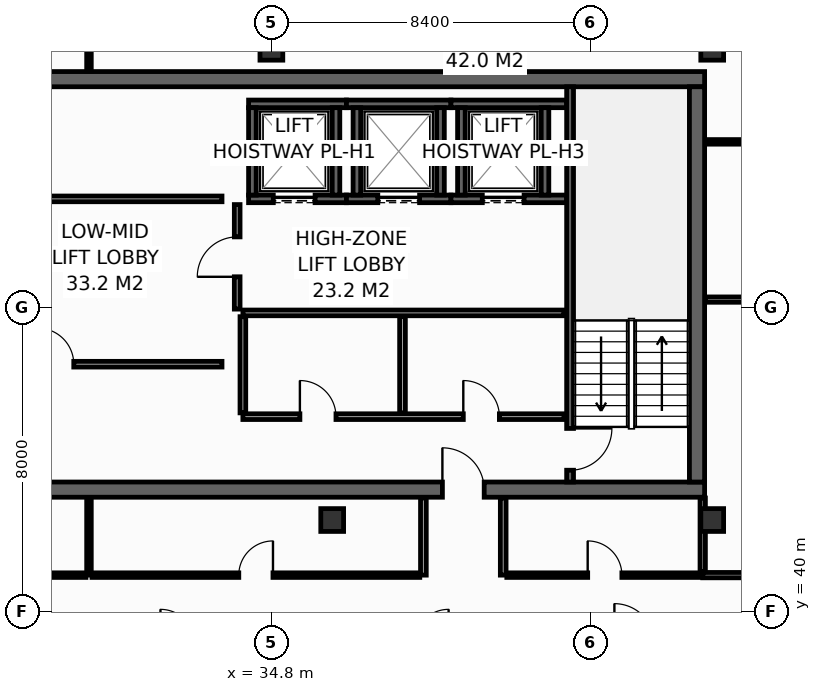
"""IFC4 building model, lengths in metres.
Left out: names, types, materials, properties, quantities, classifications, styles, units other than length and angle.
Written with IfcOpenShell. Run it as: python <this file> out.ifc"""

import sys

from ifc_helpers import new_model, si_unit, direction, frame, frame_2d, origin, origin_2d, place, context, subcontext, project, spatial, rectangle, hollow_rectangle, extrude, element, fill, save


model = new_model("IFC4")
c1 = context("Model", 3, precision=1e-05, world=origin(), true_north=direction((0.0, 1.0)))
c2 = subcontext(c1, "Body", "Model", "MODEL_VIEW")
j1 = project(units=[si_unit("LENGTHUNIT", "METRE"), si_unit("PLANEANGLEUNIT", "RADIAN")], contexts=[c1])
p1 = place(None, origin())
s1 = spatial("IfcSite", under=j1, at=p1, CompositionType="ELEMENT")
p2 = place(p1, origin())
s2 = spatial("IfcBuilding", under=s1, at=p2, CompositionType="ELEMENT")
p3 = place(p2, frame((0.0, 0.0, 283.8)))
s3 = spatial("IfcBuildingStorey", under=s2, at=p3, CompositionType="ELEMENT", Elevation=283.8)
p4 = place(p3, frame((13.7, 43.2, 0.0), z_axis=(0.0, 0.0, 1.0), x_axis=(1.0, 0.0, 0.0)))
e1 = element("IfcWall", 1, at=p4, inside=s3, PredefinedType="SHEAR", context=c2, shape_type="SweptSolid", body=[
    extrude(rectangle(XDim=32.5, YDim=0.4, at=frame_2d((16.25, 0.0))), origin(), (0.0, 0.0, 1.0), 3.55),
])
p5 = place(p4, frame((5.4, 0.0, 0.0)))
e2 = element("IfcOpeningElement", 2, at=p5, cuts=e1, PredefinedType="OPENING", context=c2, shape_type="SweptSolid", body=[
    extrude(rectangle(XDim=1.1, YDim=2.15, at=frame_2d((0.55, 1.075))), frame((0.0, 0.21, 0.0), z_axis=(0.0, -1.0, 0.0), x_axis=(1.0, 0.0, 0.0)), (0.0, 0.0, 1.0), 0.42),
])
p6 = place(p4, frame((25.6, 0.0, 0.0)))
e3 = element("IfcOpeningElement", 3, at=p6, cuts=e1, PredefinedType="OPENING", context=c2, shape_type="SweptSolid", body=[
    extrude(rectangle(XDim=1.1, YDim=2.15, at=frame_2d((0.55, 1.075))), frame((0.0, 0.21, 0.0), z_axis=(0.0, -1.0, 0.0), x_axis=(1.0, 0.0, 0.0)), (0.0, 0.0, 1.0), 0.42),
])
p7 = place(p3, frame((13.7, 54.0, 0.0), z_axis=(0.0, 0.0, 1.0), x_axis=(1.0, 0.0, 0.0)))
e4 = element("IfcWall", 4, at=p7, inside=s3, PredefinedType="SHEAR", context=c2, shape_type="SweptSolid", body=[
    extrude(rectangle(XDim=32.5, YDim=0.4, at=frame_2d((16.25, 0.0))), origin(), (0.0, 0.0, 1.0), 3.55),
])
p8 = place(p3, frame((46.0, 43.4, 0.0), z_axis=(0.0, 0.0, 1.0), x_axis=(0.0, 1.0, 0.0)))
e5 = element("IfcWall", 5, at=p8, inside=s3, PredefinedType="SHEAR", context=c2, shape_type="SweptSolid", body=[
    extrude(rectangle(XDim=10.4, YDim=0.4, at=frame_2d((5.2, 0.0))), origin(), (0.0, 0.0, 1.0), 3.55),
])
for number, where, z_axis, x_axis in (
    (6, (34.8, 54.8, 0.0), (0.0, 0.0, 1.0), (1.0, 0.0, 0.0)),
    (7, (46.4, 54.8, 0.0), (0.0, 0.0, 1.0), (1.0, 0.0, 0.0)),
    (8, (36.4, 42.4, 0.0), (0.0, 0.0, 1.0), (1.0, 0.0, 0.0)),
    (9, (46.4, 42.4, 0.0), (0.0, 0.0, 1.0), (1.0, 0.0, 0.0)),
):
    element("IfcColumn", number, at=place(p3, frame(where, z_axis=z_axis, x_axis=x_axis)), inside=s3, PredefinedType="COLUMN", context=c2, shape_type="SweptSolid", body=[
        extrude(hollow_rectangle(XDim=0.6, YDim=0.6, WallThickness=0.028, at=origin_2d()), origin(), (0.0, 0.0, 1.0), 3.8),
    ])
p9 = place(p3, frame((34.2, 50.85, 0.0), z_axis=(0.0, 0.0, 1.0), x_axis=(1.0, 0.0, 0.0)))
e10 = element("IfcWall", 10, at=p9, inside=s3, PredefinedType="SHEAR", context=c2, shape_type="SweptSolid", body=[
    extrude(rectangle(XDim=2.575, YDim=0.2, at=frame_2d((1.288, 0.0))), origin(), (0.0, 0.0, 1.0), 3.55),
])
p10 = place(p9, frame((0.65, 0.0, 0.0)))
e11 = element("IfcOpeningElement", 11, at=p10, cuts=e10, PredefinedType="OPENING", context=c2, shape_type="SweptSolid", body=[
    extrude(rectangle(XDim=1.1, YDim=2.2, at=frame_2d((0.55, 1.1))), frame((0.0, 0.11, 0.0), z_axis=(0.0, -1.0, 0.0), x_axis=(1.0, 0.0, 0.0)), (0.0, 0.0, 1.0), 0.22),
])
p11 = place(p3, frame((34.2, 53.35, 0.0), z_axis=(0.0, 0.0, 1.0), x_axis=(1.0, 0.0, 0.0)))
e12 = element("IfcWall", 12, at=p11, inside=s3, PredefinedType="SHEAR", context=c2, shape_type="SweptSolid", body=[
    extrude(rectangle(XDim=2.575, YDim=0.2, at=frame_2d((1.288, 0.0))), origin(), (0.0, 0.0, 1.0), 3.55),
])
for number, where, z_axis, x_axis in (
    (13, (34.3, 50.95, 0.0), (0.0, 0.0, 1.0), (0.0, 1.0, 0.0)),
    (14, (36.5, 50.95, 0.0), (0.0, 0.0, 1.0), (0.0, 1.0, 0.0)),
):
    element("IfcWall", number, at=place(p3, frame(where, z_axis=z_axis, x_axis=x_axis)), inside=s3, PredefinedType="SHEAR", context=c2, shape_type="SweptSolid", body=[
        extrude(rectangle(XDim=2.3, YDim=0.2, at=frame_2d((1.15, 0.0))), origin(), (0.0, 0.0, 1.0), 3.55),
    ])
p12 = place(p3, frame((36.775, 50.85, 0.0), z_axis=(0.0, 0.0, 1.0), x_axis=(1.0, 0.0, 0.0)))
e15 = element("IfcWall", 15, at=p12, inside=s3, PredefinedType="SHEAR", context=c2, shape_type="SweptSolid", body=[
    extrude(rectangle(XDim=2.75, YDim=0.2, at=frame_2d((1.375, 0.0))), origin(), (0.0, 0.0, 1.0), 3.55),
])
p13 = place(p12, frame((0.825, 0.0, 0.0)))
e16 = element("IfcOpeningElement", 16, at=p13, cuts=e15, PredefinedType="OPENING", context=c2, shape_type="SweptSolid", body=[
    extrude(rectangle(XDim=1.1, YDim=2.2, at=frame_2d((0.55, 1.1))), frame((0.0, 0.11, 0.0), z_axis=(0.0, -1.0, 0.0), x_axis=(1.0, 0.0, 0.0)), (0.0, 0.0, 1.0), 0.22),
])
p14 = place(p3, frame((36.775, 53.35, 0.0), z_axis=(0.0, 0.0, 1.0), x_axis=(1.0, 0.0, 0.0)))
e17 = element("IfcWall", 17, at=p14, inside=s3, PredefinedType="SHEAR", context=c2, shape_type="SweptSolid", body=[
    extrude(rectangle(XDim=2.75, YDim=0.2, at=frame_2d((1.375, 0.0))), origin(), (0.0, 0.0, 1.0), 3.55),
])
for number, where, z_axis, x_axis in (
    (18, (37.05, 50.95, 0.0), (0.0, 0.0, 1.0), (0.0, 1.0, 0.0)),
    (19, (39.25, 50.95, 0.0), (0.0, 0.0, 1.0), (0.0, 1.0, 0.0)),
):
    element("IfcWall", number, at=place(p3, frame(where, z_axis=z_axis, x_axis=x_axis)), inside=s3, PredefinedType="SHEAR", context=c2, shape_type="SweptSolid", body=[
        extrude(rectangle(XDim=2.3, YDim=0.2, at=frame_2d((1.15, 0.0))), origin(), (0.0, 0.0, 1.0), 3.55),
    ])
p15 = place(p3, frame((39.525, 50.85, 0.0), z_axis=(0.0, 0.0, 1.0), x_axis=(1.0, 0.0, 0.0)))
e20 = element("IfcWall", 20, at=p15, inside=s3, PredefinedType="SHEAR", context=c2, shape_type="SweptSolid", body=[
    extrude(rectangle(XDim=3.045, YDim=0.2, at=frame_2d((1.522, 0.0))), origin(), (0.0, 0.0, 1.0), 3.55),
])
p16 = place(p15, frame((0.825, 0.0, 0.0)))
e21 = element("IfcOpeningElement", 21, at=p16, cuts=e20, PredefinedType="OPENING", context=c2, shape_type="SweptSolid", body=[
    extrude(rectangle(XDim=1.1, YDim=2.2, at=frame_2d((0.55, 1.1))), frame((0.0, 0.11, 0.0), z_axis=(0.0, -1.0, 0.0), x_axis=(1.0, 0.0, 0.0)), (0.0, 0.0, 1.0), 0.22),
])
p17 = place(p3, frame((39.525, 53.35, 0.0), z_axis=(0.0, 0.0, 1.0), x_axis=(1.0, 0.0, 0.0)))
e22 = element("IfcWall", 22, at=p17, inside=s3, PredefinedType="SHEAR", context=c2, shape_type="SweptSolid", body=[
    extrude(rectangle(XDim=3.045, YDim=0.2, at=frame_2d((1.522, 0.0))), origin(), (0.0, 0.0, 1.0), 3.55),
])
for number, where, z_axis, x_axis in (
    (23, (39.8, 50.95, 0.0), (0.0, 0.0, 1.0), (0.0, 1.0, 0.0)),
    (24, (42.0, 50.95, 0.0), (0.0, 0.0, 1.0), (0.0, 1.0, 0.0)),
):
    element("IfcWall", number, at=place(p3, frame(where, z_axis=z_axis, x_axis=x_axis)), inside=s3, PredefinedType="SHEAR", context=c2, shape_type="SweptSolid", body=[
        extrude(rectangle(XDim=2.3, YDim=0.2, at=frame_2d((1.15, 0.0))), origin(), (0.0, 0.0, 1.0), 3.55),
    ])
p18 = place(p3, frame((42.66, 53.8, 0.0), z_axis=(0.0, 0.0, 1.0), x_axis=(0.0, -1.0, 0.0)))
e25 = element("IfcWall", 25, at=p18, inside=s3, PredefinedType="SHEAR", context=c2, shape_type="SweptSolid", body=[
    extrude(rectangle(XDim=10.4, YDim=0.18, at=frame_2d((5.2, 0.0))), origin(), (0.0, 0.0, 1.0), 3.55),
])
p19 = place(p18, frame((8.99, 0.0, 0.0)))
e26 = element("IfcOpeningElement", 26, at=p19, cuts=e25, PredefinedType="OPENING", context=c2, shape_type="SweptSolid", body=[
    extrude(rectangle(XDim=1.1, YDim=2.15, at=frame_2d((0.55, 1.075))), frame((0.0, 0.1, 0.0), z_axis=(0.0, -1.0, 0.0), x_axis=(1.0, 0.0, 0.0)), (0.0, 0.0, 1.0), 0.2),
])
p20 = place(p3, frame((33.9, 47.95, 0.0), z_axis=(0.0, 0.0, 1.0), x_axis=(0.0, 1.0, 0.0)))
e27 = element("IfcWall", 27, at=p20, inside=s3, PredefinedType="PARTITIONING", context=c2, shape_type="SweptSolid", body=[
    extrude(rectangle(XDim=2.75, YDim=0.15, at=frame_2d((1.375, 0.0))), origin(), (0.0, 0.0, 1.0), 3.55),
])
p21 = place(p20, frame((0.85, 0.0, 0.0)))
e28 = element("IfcOpeningElement", 28, at=p21, cuts=e27, PredefinedType="OPENING", context=c2, shape_type="SweptSolid", body=[
    extrude(rectangle(XDim=1.05, YDim=2.15, at=frame_2d((0.525, 1.075))), frame((0.0, 0.085, 0.0), z_axis=(0.0, -1.0, 0.0), x_axis=(1.0, 0.0, 0.0)), (0.0, 0.0, 1.0), 0.17),
])
p22 = place(p3, frame((34.05, 45.12, 0.0), z_axis=(0.0, 0.0, 1.0), x_axis=(1.0, 0.0, 0.0)))
e29 = element("IfcWall", 29, at=p22, inside=s3, PredefinedType="PARTITIONING", context=c2, shape_type="SweptSolid", body=[
    extrude(rectangle(XDim=8.45, YDim=0.15, at=frame_2d((4.225, 0.0))), origin(), (0.0, 0.0, 1.0), 3.55),
])
p23 = place(p22, frame((1.5, 0.0, 0.0)))
e30 = element("IfcOpeningElement", 30, at=p23, cuts=e29, PredefinedType="OPENING", context=c2, shape_type="SweptSolid", body=[
    extrude(rectangle(XDim=0.95, YDim=2.15, at=frame_2d((0.475, 1.075))), frame((0.0, 0.085, 0.0), z_axis=(0.0, -1.0, 0.0), x_axis=(1.0, 0.0, 0.0)), (0.0, 0.0, 1.0), 0.17),
])
p24 = place(p22, frame((5.8, 0.0, 0.0)))
e31 = element("IfcOpeningElement", 31, at=p24, cuts=e29, PredefinedType="OPENING", context=c2, shape_type="SweptSolid", body=[
    extrude(rectangle(XDim=0.95, YDim=2.15, at=frame_2d((0.475, 1.075))), frame((0.0, 0.085, 0.0), z_axis=(0.0, -1.0, 0.0), x_axis=(1.0, 0.0, 0.0)), (0.0, 0.0, 1.0), 0.17),
])
p25 = place(p3, frame((34.05, 47.85, 0.0), z_axis=(0.0, 0.0, 1.0), x_axis=(1.0, 0.0, 0.0)))
e32 = element("IfcWall", 32, at=p25, inside=s3, PredefinedType="PARTITIONING", context=c2, shape_type="SweptSolid", body=[
    extrude(rectangle(XDim=8.45, YDim=0.15, at=frame_2d((4.225, 0.0))), origin(), (0.0, 0.0, 1.0), 3.55),
])
for number, where, z_axis, x_axis in (
    (33, (38.25, 45.22, 0.0), (0.0, 0.0, 1.0), (0.0, 1.0, 0.0)),
    (34, (34.05, 45.22, 0.0), (0.0, 0.0, 1.0), (0.0, 1.0, 0.0)),
):
    element("IfcWall", number, at=place(p3, frame(where, z_axis=z_axis, x_axis=x_axis)), inside=s3, PredefinedType="PARTITIONING", context=c2, shape_type="SweptSolid", body=[
        extrude(rectangle(XDim=2.53, YDim=0.15, at=frame_2d((1.265, 0.0))), origin(), (0.0, 0.0, 1.0), 3.55),
    ])
p26 = place(p3, frame((25.85, 50.85, 0.0), z_axis=(0.0, 0.0, 1.0), x_axis=(1.0, 0.0, 0.0)))
e35 = element("IfcWall", 35, at=p26, inside=s3, PredefinedType="PARTITIONING", context=c2, shape_type="SweptSolid", body=[
    extrude(rectangle(XDim=7.65, YDim=0.15, at=frame_2d((3.825, 0.0))), origin(), (0.0, 0.0, 1.0), 3.55),
])
p27 = place(p26, frame((1.25, 0.0, 0.0)))
e36 = element("IfcOpeningElement", 36, at=p27, cuts=e35, PredefinedType="OPENING", context=c2, shape_type="SweptSolid", body=[
    extrude(rectangle(XDim=0.95, YDim=2.15, at=frame_2d((0.475, 1.075))), frame((0.0, 0.085, 0.0), z_axis=(0.0, -1.0, 0.0), x_axis=(1.0, 0.0, 0.0)), (0.0, 0.0, 1.0), 0.17),
])
p28 = place(p3, frame((25.85, 46.5, 0.0), z_axis=(0.0, 0.0, 1.0), x_axis=(1.0, 0.0, 0.0)))
e37 = element("IfcWall", 37, at=p28, inside=s3, PredefinedType="PARTITIONING", context=c2, shape_type="SweptSolid", body=[
    extrude(rectangle(XDim=7.65, YDim=0.15, at=frame_2d((3.825, 0.0))), origin(), (0.0, 0.0, 1.0), 3.55),
])
p29 = place(p28, frame((2.8, 0.0, 0.0)))
e38 = element("IfcOpeningElement", 38, at=p29, cuts=e37, PredefinedType="OPENING", context=c2, shape_type="SweptSolid", body=[
    extrude(rectangle(XDim=0.95, YDim=2.15, at=frame_2d((0.475, 1.075))), frame((0.0, 0.085, 0.0), z_axis=(0.0, -1.0, 0.0), x_axis=(1.0, 0.0, 0.0)), (0.0, 0.0, 1.0), 0.17),
])
p30 = place(p3, frame((46.15, 40.95, 0.0), z_axis=(0.0, 0.0, 1.0), x_axis=(1.0, 0.0, 0.0)))
e39 = element("IfcWall", 39, at=p30, inside=s3, PredefinedType="PARTITIONING", context=c2, shape_type="SweptSolid", body=[
    extrude(rectangle(XDim=4.05, YDim=0.14, at=frame_2d((2.025, 0.0))), origin(), (0.0, 0.0, 1.0), 3.55),
])
p31 = place(p3, frame((46.15, 41.04, 0.0), z_axis=(0.0, 0.0, 1.0), x_axis=(0.0, 1.0, 0.0)))
e40 = element("IfcWall", 40, at=p31, inside=s3, PredefinedType="PARTITIONING", context=c2, shape_type="SweptSolid", body=[
    extrude(rectangle(XDim=1.94, YDim=0.14, at=frame_2d((0.97, 0.0))), origin(), (0.0, 0.0, 1.0), 3.55),
])
p32 = place(p3, frame((46.22, 48.2, 0.0), z_axis=(0.0, 0.0, 1.0), x_axis=(1.0, 0.0, 0.0)))
e41 = element("IfcWall", 41, at=p32, inside=s3, PredefinedType="PARTITIONING", context=c2, shape_type="SweptSolid", body=[
    extrude(rectangle(XDim=3.98, YDim=0.14, at=frame_2d((1.99, 0.0))), origin(), (0.0, 0.0, 1.0), 3.55),
])
p33 = place(p3, frame((46.22, 52.35, 0.0), z_axis=(0.0, 0.0, 1.0), x_axis=(1.0, 0.0, 0.0)))
e42 = element("IfcWall", 42, at=p33, inside=s3, PredefinedType="PARTITIONING", context=c2, shape_type="SweptSolid", body=[
    extrude(rectangle(XDim=3.98, YDim=0.12, at=frame_2d((1.99, 0.0))), origin(), (0.0, 0.0, 1.0), 3.55),
])
p34 = place(p3, frame((30.0, 54.22, 0.0), z_axis=(0.0, 0.0, 1.0), x_axis=(0.0, 1.0, 0.0)))
e43 = element("IfcWall", 43, at=p34, inside=s3, PredefinedType="PARTITIONING", context=c2, shape_type="SweptSolid", body=[
    extrude(rectangle(XDim=1.775, YDim=0.12, at=frame_2d((0.888, 0.0))), origin(), (0.0, 0.0, 1.0), 2.935),
])
for number, where, z_axis, x_axis in (
    (44, (38.8, 40.95, 0.0), (0.0, 0.0, 1.0), (0.0, 1.0, 0.0)),
    (45, (40.9, 40.95, 0.0), (0.0, 0.0, 1.0), (0.0, 1.0, 0.0)),
):
    element("IfcWall", number, at=place(p3, frame(where, z_axis=z_axis, x_axis=x_axis)), inside=s3, PredefinedType="PARTITIONING", context=c2, shape_type="SweptSolid", body=[
        extrude(rectangle(XDim=2.03, YDim=0.15, at=frame_2d((1.015, 0.0))), origin(), (0.0, 0.0, 1.0), 3.55),
    ])
p35 = place(p3, frame((30.0, 40.95, 0.0), z_axis=(0.0, 0.0, 1.0), x_axis=(0.0, 1.0, 0.0)))
e46 = element("IfcWall", 46, at=p35, inside=s3, PredefinedType="PARTITIONING", context=c2, shape_type="SweptSolid", body=[
    extrude(rectangle(XDim=2.03, YDim=0.12, at=frame_2d((1.015, 0.0))), origin(), (0.0, 0.0, 1.0), 2.947),
])
p36 = place(p3, frame((20.795, 40.95, 0.0), z_axis=(0.0, 0.0, 1.0), x_axis=(1.0, 0.0, 0.0)))
e47 = element("IfcWall", 47, at=p36, inside=s3, PredefinedType="PARTITIONING", context=c2, shape_type="SweptSolid", body=[
    extrude(rectangle(XDim=9.125, YDim=0.12, at=frame_2d((4.562, 0.0))), origin(), (0.0, 0.0, 1.0), 3.047),
])
p37 = place(p36, frame((4.037, 0.0, 0.0)))
e48 = element("IfcOpeningElement", 48, at=p37, cuts=e47, PredefinedType="OPENING", context=c2, shape_type="SweptSolid", body=[
    extrude(rectangle(XDim=1.05, YDim=2.15, at=frame_2d((0.525, 1.075))), frame((0.0, 0.07, 0.0), z_axis=(0.0, -1.0, 0.0), x_axis=(1.0, 0.0, 0.0)), (0.0, 0.0, 1.0), 0.14),
])
p38 = place(p3, frame((30.08, 40.95, 0.0), z_axis=(0.0, 0.0, 1.0), x_axis=(1.0, 0.0, 0.0)))
e49 = element("IfcWall", 49, at=p38, inside=s3, PredefinedType="PARTITIONING", context=c2, shape_type="SweptSolid", body=[
    extrude(rectangle(XDim=8.625, YDim=0.12, at=frame_2d((4.312, 0.0))), origin(), (0.0, 0.0, 1.0), 3.047),
])
p39 = place(p38, frame((3.862, 0.0, 0.0)))
e50 = element("IfcOpeningElement", 50, at=p39, cuts=e49, PredefinedType="OPENING", context=c2, shape_type="SweptSolid", body=[
    extrude(rectangle(XDim=0.9, YDim=2.1, at=frame_2d((0.45, 1.05))), frame((0.0, 0.07, 0.0), z_axis=(0.0, -1.0, 0.0), x_axis=(1.0, 0.0, 0.0)), (0.0, 0.0, 1.0), 0.14),
])
p40 = place(p3, frame((40.995, 40.95, 0.0), z_axis=(0.0, 0.0, 1.0), x_axis=(1.0, 0.0, 0.0)))
e51 = element("IfcWall", 51, at=p40, inside=s3, PredefinedType="PARTITIONING", context=c2, shape_type="SweptSolid", body=[
    extrude(rectangle(XDim=5.155, YDim=0.12, at=frame_2d((2.577, 0.0))), origin(), (0.0, 0.0, 1.0), 3.55),
])
p41 = place(p40, frame((2.128, 0.0, 0.0)))
e52 = element("IfcOpeningElement", 52, at=p41, cuts=e51, PredefinedType="OPENING", context=c2, shape_type="SweptSolid", body=[
    extrude(rectangle(XDim=0.9, YDim=2.1, at=frame_2d((0.45, 1.05))), frame((0.0, 0.07, 0.0), z_axis=(0.0, -1.0, 0.0), x_axis=(1.0, 0.0, 0.0)), (0.0, 0.0, 1.0), 0.14),
])
p42 = place(p10, origin())
e53 = element("IfcDoor", 53, at=p42, inside=s3, OperationType="SLIDING_TO_LEFT", PredefinedType="DOOR", context=c2, shape_type="SweptSolid", body=[
    extrude(rectangle(XDim=1.1, YDim=2.2, at=frame_2d((0.55, 1.1))), frame((0.0, 0.025, 0.0), z_axis=(0.0, -1.0, 0.0), x_axis=(1.0, 0.0, 0.0)), (0.0, 0.0, 1.0), 0.05),
])
fill(e11, e53)
p43 = place(p13, origin())
e54 = element("IfcDoor", 54, at=p43, inside=s3, OperationType="SLIDING_TO_LEFT", PredefinedType="DOOR", context=c2, shape_type="SweptSolid", body=[
    extrude(rectangle(XDim=1.1, YDim=2.2, at=frame_2d((0.55, 1.1))), frame((0.0, 0.025, 0.0), z_axis=(0.0, -1.0, 0.0), x_axis=(1.0, 0.0, 0.0)), (0.0, 0.0, 1.0), 0.05),
])
fill(e16, e54)
p44 = place(p16, origin())
e55 = element("IfcDoor", 55, at=p44, inside=s3, OperationType="SLIDING_TO_LEFT", PredefinedType="DOOR", context=c2, shape_type="SweptSolid", body=[
    extrude(rectangle(XDim=1.1, YDim=2.2, at=frame_2d((0.55, 1.1))), frame((0.0, 0.025, 0.0), z_axis=(0.0, -1.0, 0.0), x_axis=(1.0, 0.0, 0.0)), (0.0, 0.0, 1.0), 0.05),
])
fill(e21, e55)
p45 = place(p19, origin())
e56 = element("IfcDoor", 56, at=p45, inside=s3, OperationType="SINGLE_SWING_LEFT", PredefinedType="DOOR", context=c2, shape_type="SweptSolid", body=[
    extrude(rectangle(XDim=1.1, YDim=2.15, at=frame_2d((0.55, 1.075))), frame((0.0, 0.025, 0.0), z_axis=(0.0, -1.0, 0.0), x_axis=(1.0, 0.0, 0.0)), (0.0, 0.0, 1.0), 0.05),
])
fill(e26, e56)
p46 = place(p6, origin())
e57 = element("IfcDoor", 57, at=p46, inside=s3, OperationType="SINGLE_SWING_LEFT", PredefinedType="DOOR", context=c2, shape_type="SweptSolid", body=[
    extrude(rectangle(XDim=1.1, YDim=2.15, at=frame_2d((0.55, 1.075))), frame((0.0, 0.025, 0.0), z_axis=(0.0, -1.0, 0.0), x_axis=(1.0, 0.0, 0.0)), (0.0, 0.0, 1.0), 0.05),
])
fill(e3, e57)
p47 = place(p21, origin())
e58 = element("IfcDoor", 58, at=p47, inside=s3, OperationType="SINGLE_SWING_LEFT", PredefinedType="DOOR", context=c2, shape_type="SweptSolid", body=[
    extrude(rectangle(XDim=1.05, YDim=2.15, at=frame_2d((0.525, 1.075))), frame((0.0, 0.025, 0.0), z_axis=(0.0, -1.0, 0.0), x_axis=(1.0, 0.0, 0.0)), (0.0, 0.0, 1.0), 0.05),
])
fill(e28, e58)
p48 = place(p23, origin())
e59 = element("IfcDoor", 59, at=p48, inside=s3, OperationType="SINGLE_SWING_LEFT", PredefinedType="DOOR", context=c2, shape_type="SweptSolid", body=[
    extrude(rectangle(XDim=0.95, YDim=2.15, at=frame_2d((0.475, 1.075))), frame((0.0, 0.025, 0.0), z_axis=(0.0, -1.0, 0.0), x_axis=(1.0, 0.0, 0.0)), (0.0, 0.0, 1.0), 0.05),
])
fill(e30, e59)
p49 = place(p24, origin())
e60 = element("IfcDoor", 60, at=p49, inside=s3, OperationType="SINGLE_SWING_LEFT", PredefinedType="DOOR", context=c2, shape_type="SweptSolid", body=[
    extrude(rectangle(XDim=0.95, YDim=2.15, at=frame_2d((0.475, 1.075))), frame((0.0, 0.025, 0.0), z_axis=(0.0, -1.0, 0.0), x_axis=(1.0, 0.0, 0.0)), (0.0, 0.0, 1.0), 0.05),
])
fill(e31, e60)
p50 = place(p29, origin())
e61 = element("IfcDoor", 61, at=p50, inside=s3, OperationType="SINGLE_SWING_LEFT", PredefinedType="DOOR", context=c2, shape_type="SweptSolid", body=[
    extrude(rectangle(XDim=0.95, YDim=2.15, at=frame_2d((0.475, 1.075))), frame((0.0, 0.025, 0.0), z_axis=(0.0, -1.0, 0.0), x_axis=(1.0, 0.0, 0.0)), (0.0, 0.0, 1.0), 0.05),
])
fill(e38, e61)
p51 = place(p39, origin())
e62 = element("IfcDoor", 62, at=p51, inside=s3, OperationType="SINGLE_SWING_RIGHT", PredefinedType="DOOR", context=c2, shape_type="SweptSolid", body=[
    extrude(rectangle(XDim=0.9, YDim=2.1, at=frame_2d((0.45, 1.05))), frame((0.0, 0.025, 0.0), z_axis=(0.0, -1.0, 0.0), x_axis=(1.0, 0.0, 0.0)), (0.0, 0.0, 1.0), 0.05),
])
fill(e50, e62)
p52 = place(p41, origin())
e63 = element("IfcDoor", 63, at=p52, inside=s3, OperationType="SINGLE_SWING_LEFT", PredefinedType="DOOR", context=c2, shape_type="SweptSolid", body=[
    extrude(rectangle(XDim=0.9, YDim=2.1, at=frame_2d((0.45, 1.05))), frame((0.0, 0.025, 0.0), z_axis=(0.0, -1.0, 0.0), x_axis=(1.0, 0.0, 0.0)), (0.0, 0.0, 1.0), 0.05),
])
fill(e52, e63)
save(model, sys.argv[1])
